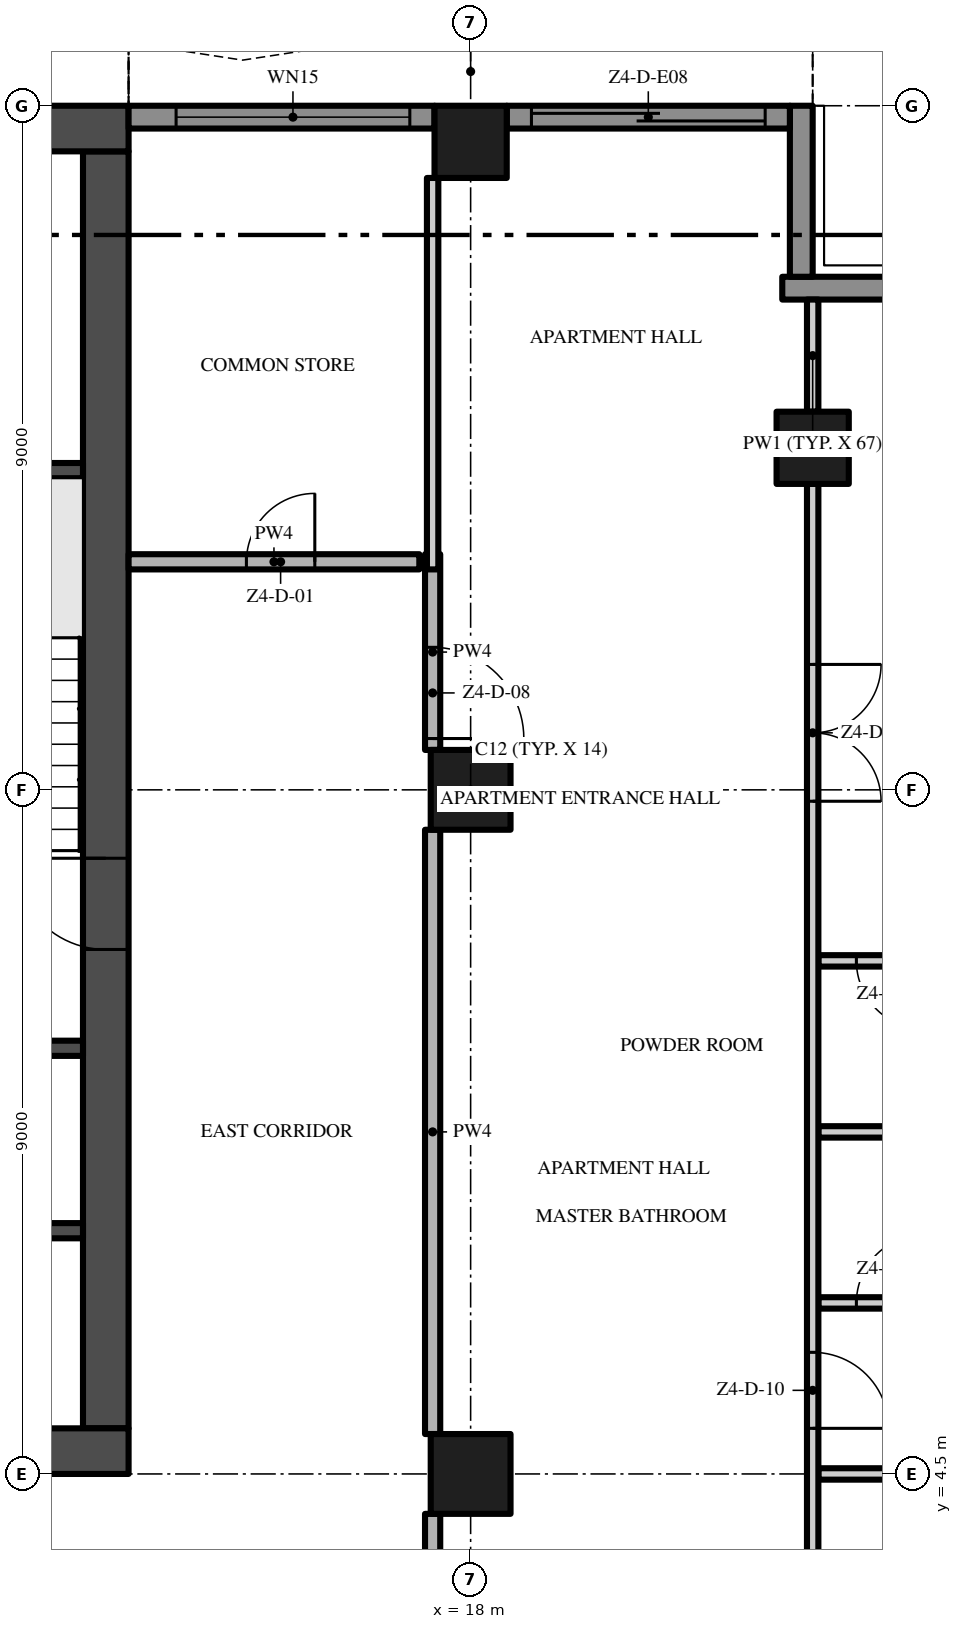
"""IFC4 building model, lengths in metres.
Left out: names, types, materials, properties, quantities, classifications, styles, units other than length and angle.
Written with IfcOpenShell. Run it as: python <this file> out.ifc"""

import sys

from ifc_helpers import new_model, si_unit, direction, frame, frame_2d, origin, origin_2d, place, context, subcontext, project, spatial, polyline, rectangle, outline, extrude, element, fill, save


model = new_model("IFC4")
c1 = context("Model", 3, precision=1e-05, world=origin(), true_north=direction((0.0, 1.0)))
c2 = subcontext(c1, "Body", "Model", "MODEL_VIEW")
j1 = project(units=[si_unit("LENGTHUNIT", "METRE"), si_unit("PLANEANGLEUNIT", "RADIAN")], contexts=[c1])
p1 = place(None, origin())
s1 = spatial("IfcSite", under=j1, at=p1, CompositionType="ELEMENT")
p2 = place(p1, origin())
s2 = spatial("IfcBuilding", under=s1, at=p2, CompositionType="ELEMENT")
p3 = place(p2, frame((0.0, 0.0, 218.6)))
s3 = spatial("IfcBuildingStorey", under=s2, at=p3, CompositionType="ELEMENT", Elevation=218.6)
p4 = place(p3, frame((-13.5, 4.8, -0.3), z_axis=(0.0, 0.0, 1.0), x_axis=(1.0, 0.0, 0.0)))
e1 = element("IfcWall", 1, at=p4, inside=s3, PredefinedType="SHEAR", context=c2, shape_type="SweptSolid", body=[
    extrude(rectangle(XDim=27.0, YDim=0.6, at=frame_2d((13.5, 0.0))), origin(), (0.0, 0.0, 1.0), 3.8),
])
p5 = place(p4, frame((12.0, 0.0, 0.3)))
e2 = element("IfcOpeningElement", 2, at=p5, cuts=e1, PredefinedType="OPENING", context=c2, shape_type="SweptSolid", body=[
    extrude(rectangle(XDim=3.0, YDim=2.4, at=frame_2d((1.5, 1.2))), frame((0.0, 0.31, 0.0), z_axis=(0.0, -1.0, 0.0), x_axis=(1.0, 0.0, 0.0)), (0.0, 0.0, 1.0), 0.62),
])
p6 = place(p4, frame((4.9, 0.0, 0.3)))
e3 = element("IfcOpeningElement", 3, at=p6, cuts=e1, PredefinedType="OPENING", context=c2, shape_type="SweptSolid", body=[
    extrude(rectangle(XDim=1.2, YDim=2.2, at=frame_2d((0.6, 1.1))), frame((0.0, 0.31, 0.0), z_axis=(0.0, -1.0, 0.0), x_axis=(1.0, 0.0, 0.0)), (0.0, 0.0, 1.0), 0.62),
])
p7 = place(p4, frame((20.75, 0.0, 0.3)))
e4 = element("IfcOpeningElement", 4, at=p7, cuts=e1, PredefinedType="OPENING", context=c2, shape_type="SweptSolid", body=[
    extrude(rectangle(XDim=1.5, YDim=2.2, at=frame_2d((0.75, 1.1))), frame((0.0, 0.31, 0.0), z_axis=(0.0, -1.0, 0.0), x_axis=(1.0, 0.0, 0.0)), (0.0, 0.0, 1.0), 0.62),
])
p8 = place(p4, frame((17.4, 0.0, 0.3)))
e5 = element("IfcOpeningElement", 5, at=p8, cuts=e1, PredefinedType="OPENING", context=c2, shape_type="SweptSolid", body=[
    extrude(rectangle(XDim=1.2, YDim=2.2, at=frame_2d((0.6, 1.1))), frame((0.0, 0.31, 0.0), z_axis=(0.0, -1.0, 0.0), x_axis=(1.0, 0.0, 0.0)), (0.0, 0.0, 1.0), 0.62),
])
p9 = place(p3, frame((13.2, 5.1, -0.3), z_axis=(0.0, 0.0, 1.0), x_axis=(0.0, 1.0, 0.0)))
e6 = element("IfcWall", 6, at=p9, inside=s3, PredefinedType="SHEAR", context=c2, shape_type="SweptSolid", body=[
    extrude(rectangle(XDim=16.8, YDim=0.6, at=frame_2d((8.4, 0.0))), origin(), (0.0, 0.0, 1.0), 3.8),
])
p10 = place(p9, frame((6.3, 0.0, 0.3)))
e7 = element("IfcOpeningElement", 7, at=p10, cuts=e6, PredefinedType="OPENING", context=c2, shape_type="SweptSolid", body=[
    extrude(rectangle(XDim=1.2, YDim=2.2, at=frame_2d((0.6, 1.1))), frame((0.0, 0.31, 0.0), z_axis=(0.0, -1.0, 0.0), x_axis=(1.0, 0.0, 0.0)), (0.0, 0.0, 1.0), 0.62),
])
p11 = place(p3, frame((13.5, 22.2, -0.3), z_axis=(0.0, 0.0, 1.0), x_axis=(-1.0, 0.0, 0.0)))
e8 = element("IfcWall", 8, at=p11, inside=s3, PredefinedType="SHEAR", context=c2, shape_type="SweptSolid", body=[
    extrude(rectangle(XDim=27.0, YDim=0.6, at=frame_2d((13.5, 0.0))), origin(), (0.0, 0.0, 1.0), 3.8),
])
p12 = place(p3, frame((18.0, 13.5, 0.0), z_axis=(0.0, 0.0, 1.0), x_axis=(1.0, 0.0, 0.0)))
e9 = element("IfcColumn", 9, at=p12, inside=s3, PredefinedType="COLUMN", context=c2, shape_type="SweptSolid", body=[
    extrude(rectangle(XDim=1.05, YDim=1.05, at=origin_2d()), origin(), (0.0, 0.0, 1.0), 3.5),
])
p13 = place(p3, frame((18.0, 22.025, 0.0), z_axis=(0.0, 0.0, 1.0), x_axis=(1.0, 0.0, 0.0)))
e10 = element("IfcColumn", 10, at=p13, inside=s3, PredefinedType="COLUMN", context=c2, shape_type="SweptSolid", body=[
    extrude(rectangle(XDim=0.95, YDim=0.95, at=origin_2d()), origin(), (0.0, 0.0, 1.0), 3.5),
])
p14 = place(p3, frame((18.0, 4.5, 0.0), z_axis=(0.0, 0.0, 1.0), x_axis=(1.0, 0.0, 0.0)))
e11 = element("IfcColumn", 11, at=p14, inside=s3, PredefinedType="COLUMN", context=c2, shape_type="SweptSolid", body=[
    extrude(rectangle(XDim=1.05, YDim=1.05, at=origin_2d()), origin(), (0.0, 0.0, 1.0), 3.5),
])
p15 = place(p3, frame((22.5, 18.0, 0.0), z_axis=(0.0, 0.0, 1.0), x_axis=(1.0, 0.0, 0.0)))
e12 = element("IfcColumn", 12, at=p15, inside=s3, PredefinedType="COLUMN", context=c2, shape_type="SweptSolid", body=[
    extrude(rectangle(XDim=0.95, YDim=0.95, at=origin_2d()), origin(), (0.0, 0.0, 1.0), 3.5),
])
p16 = place(p3, frame((22.1, 20.1, 0.0), z_axis=(0.0, 0.0, 1.0), x_axis=(1.0, 0.0, 0.0)))
e13 = element("IfcWall", 13, at=p16, inside=s3, PredefinedType="SOLIDWALL", context=c2, shape_type="SweptSolid", body=[
    extrude(rectangle(XDim=2.35, YDim=0.3, at=frame_2d((1.175, 0.0))), origin(), (0.0, 0.0, 1.0), 3.5),
])
p17 = place(p3, frame((22.35, 22.5, 0.0), z_axis=(0.0, 0.0, 1.0), x_axis=(0.0, -1.0, 0.0)))
e14 = element("IfcWall", 14, at=p17, inside=s3, PredefinedType="SOLIDWALL", context=c2, shape_type="SweptSolid", body=[
    extrude(rectangle(XDim=2.25, YDim=0.3, at=frame_2d((1.125, 0.0))), origin(), (0.0, 0.0, 1.0), 3.5),
])
p18 = place(p3, frame((18.475, 22.35, 0.0), z_axis=(0.0, 0.0, 1.0), x_axis=(1.0, 0.0, 0.0)))
e15 = element("IfcWall", 15, at=p18, inside=s3, PredefinedType="SOLIDWALL", context=c2, shape_type="SweptSolid", body=[
    extrude(rectangle(XDim=3.725, YDim=0.3, at=frame_2d((1.863, 0.0))), origin(), (0.0, 0.0, 1.0), 3.5),
])
p19 = place(p18, frame((0.325, 0.0, 0.0)))
e16 = element("IfcOpeningElement", 16, at=p19, cuts=e15, PredefinedType="OPENING", context=c2, shape_type="SweptSolid", body=[
    extrude(rectangle(XDim=3.075, YDim=2.4, at=frame_2d((1.538, 1.2))), frame((0.0, 0.16, 0.0), z_axis=(0.0, -1.0, 0.0), x_axis=(1.0, 0.0, 0.0)), (0.0, 0.0, 1.0), 0.32),
])
p20 = place(p3, frame((13.5, 22.35, 0.0), z_axis=(0.0, 0.0, 1.0), x_axis=(1.0, 0.0, 0.0)))
e17 = element("IfcWall", 17, at=p20, inside=s3, PredefinedType="SOLIDWALL", context=c2, shape_type="SweptSolid", body=[
    extrude(rectangle(XDim=4.025, YDim=0.3, at=frame_2d((2.013, 0.0))), origin(), (0.0, 0.0, 1.0), 3.5),
])
p21 = place(p20, frame((0.625, 0.0, 0.45)))
e18 = element("IfcOpeningElement", 18, at=p21, cuts=e17, PredefinedType="OPENING", context=c2, shape_type="SweptSolid", body=[
    extrude(rectangle(XDim=3.075, YDim=2.65, at=frame_2d((1.538, 1.325))), frame((0.0, 0.16, 0.0), z_axis=(0.0, -1.0, 0.0), x_axis=(1.0, 0.0, 0.0)), (0.0, 0.0, 1.0), 0.32),
])
p22 = place(p3, origin())
e19 = element("IfcWall", 19, at=p22, inside=s3, PredefinedType="USERDEFINED", context=c2, shape_type="SweptSolid", body=[
    extrude(outline(polyline([(22.5, 25.5), (21.0, 25.271), (19.5, 24.671), (18.0, 23.929), (16.5, 23.329), (15.0, 23.1), (13.5, 23.329), (13.462, 23.082), (15.0, 22.847), (16.566, 23.086), (18.102, 23.701), (19.602, 24.442), (21.066, 25.028), (22.538, 25.253), (22.5, 25.5)])), origin(), (0.0, 0.0, 1.0), 0.9),
])
for number, where, z_axis, x_axis in (
    (20, (9.65, 7.7, 0.0), (0.0, 0.0, 1.0), (1.0, 0.0, 0.0)),
    (21, (9.65, 10.1, 0.0), (0.0, 0.0, 1.0), (1.0, 0.0, 0.0)),
    (22, (9.65, 17.7, 0.0), (0.0, 0.0, 1.0), (1.0, 0.0, 0.0)),
):
    element("IfcWall", number, at=place(p3, frame(where, z_axis=z_axis, x_axis=x_axis)), inside=s3, PredefinedType="SHEAR", context=c2, shape_type="SweptSolid", body=[
        extrude(rectangle(XDim=3.25, YDim=0.2, at=frame_2d((1.625, 0.0))), origin(), (0.0, 0.0, 1.0), 3.5),
    ])
p23 = place(p3, frame((22.575, 4.5, 0.0), z_axis=(0.0, 0.0, 1.0), x_axis=(1.0, 0.0, 0.0)))
e23 = element("IfcWall", 23, at=p23, inside=s3, PredefinedType="PARTITIONING", context=c2, shape_type="SweptSolid", body=[
    extrude(rectangle(XDim=3.475, YDim=0.15, at=frame_2d((1.738, 0.0))), origin(), (0.0, 0.0, 1.0), 3.5),
])
p24 = place(p3, frame((22.575, 6.75, 0.0), z_axis=(0.0, 0.0, 1.0), x_axis=(1.0, 0.0, 0.0)))
e24 = element("IfcWall", 24, at=p24, inside=s3, PredefinedType="PARTITIONING", context=c2, shape_type="SweptSolid", body=[
    extrude(rectangle(XDim=1.875, YDim=0.15, at=frame_2d((0.938, 0.0))), origin(), (0.0, 0.0, 1.0), 3.5),
])
p25 = place(p24, frame((0.5, 0.0, 0.0)))
e25 = element("IfcOpeningElement", 25, at=p25, cuts=e24, PredefinedType="OPENING", context=c2, shape_type="SweptSolid", body=[
    extrude(rectangle(XDim=0.9, YDim=2.1, at=frame_2d((0.45, 1.05))), frame((0.0, 0.085, 0.0), z_axis=(0.0, -1.0, 0.0), x_axis=(1.0, 0.0, 0.0)), (0.0, 0.0, 1.0), 0.17),
])
p26 = place(p3, frame((22.575, 9.0, 0.0), z_axis=(0.0, 0.0, 1.0), x_axis=(1.0, 0.0, 0.0)))
e26 = element("IfcWall", 26, at=p26, inside=s3, PredefinedType="PARTITIONING", context=c2, shape_type="SweptSolid", body=[
    extrude(rectangle(XDim=1.875, YDim=0.15, at=frame_2d((0.938, 0.0))), origin(), (0.0, 0.0, 1.0), 3.5),
])
p27 = place(p3, frame((24.45, 11.25, 0.0), z_axis=(0.0, 0.0, 1.0), x_axis=(-1.0, 0.0, 0.0)))
e27 = element("IfcWall", 27, at=p27, inside=s3, PredefinedType="PARTITIONING", context=c2, shape_type="SweptSolid", body=[
    extrude(rectangle(XDim=1.875, YDim=0.15, at=frame_2d((0.938, 0.0))), origin(), (0.0, 0.0, 1.0), 3.5),
])
p28 = place(p27, frame((0.475, 0.0, 0.0)))
e28 = element("IfcOpeningElement", 28, at=p28, cuts=e27, PredefinedType="OPENING", context=c2, shape_type="SweptSolid", body=[
    extrude(rectangle(XDim=0.9, YDim=2.1, at=frame_2d((0.45, 1.05))), frame((0.0, 0.085, 0.0), z_axis=(0.0, -1.0, 0.0), x_axis=(1.0, 0.0, 0.0)), (0.0, 0.0, 1.0), 0.17),
])
p29 = place(p3, frame((13.5, 16.5, 0.0), z_axis=(0.0, 0.0, 1.0), x_axis=(1.0, 0.0, 0.0)))
e29 = element("IfcWall", 29, at=p29, inside=s3, PredefinedType="PARTITIONING", context=c2, shape_type="SweptSolid", body=[
    extrude(rectangle(XDim=3.825, YDim=0.2, at=frame_2d((1.913, 0.0))), origin(), (0.0, 0.0, 1.0), 3.5),
])
p30 = place(p29, frame((1.55, 0.0, 0.0)))
e30 = element("IfcOpeningElement", 30, at=p30, cuts=e29, PredefinedType="OPENING", context=c2, shape_type="SweptSolid", body=[
    extrude(rectangle(XDim=0.9, YDim=2.1, at=frame_2d((0.45, 1.05))), frame((0.0, 0.11, 0.0), z_axis=(0.0, -1.0, 0.0), x_axis=(1.0, 0.0, 0.0)), (0.0, 0.0, 1.0), 0.22),
])
p31 = place(p3, frame((17.5, -0.2, 0.0), z_axis=(0.0, 0.0, 1.0), x_axis=(0.0, 1.0, 0.0)))
e31 = element("IfcWall", 31, at=p31, inside=s3, PredefinedType="PARTITIONING", context=c2, shape_type="SweptSolid", body=[
    extrude(rectangle(XDim=4.175, YDim=0.2, at=frame_2d((2.087, 0.0))), origin(), (0.0, 0.0, 1.0), 3.5),
])
p32 = place(p3, frame((17.5, 5.025, 0.0), z_axis=(0.0, 0.0, 1.0), x_axis=(0.0, 1.0, 0.0)))
e32 = element("IfcWall", 32, at=p32, inside=s3, PredefinedType="PARTITIONING", context=c2, shape_type="SweptSolid", body=[
    extrude(rectangle(XDim=7.95, YDim=0.2, at=frame_2d((3.975, 0.0))), origin(), (0.0, 0.0, 1.0), 3.5),
])
p33 = place(p3, frame((17.5, 16.6, 0.0), z_axis=(0.0, 0.0, 1.0), x_axis=(0.0, -1.0, 0.0)))
e33 = element("IfcWall", 33, at=p33, inside=s3, PredefinedType="PARTITIONING", context=c2, shape_type="SweptSolid", body=[
    extrude(rectangle(XDim=2.575, YDim=0.2, at=frame_2d((1.288, 0.0))), origin(), (0.0, 0.0, 1.0), 3.5),
])
p34 = place(p33, frame((1.225, 0.0, 0.0)))
e34 = element("IfcOpeningElement", 34, at=p34, cuts=e33, PredefinedType="OPENING", context=c2, shape_type="SweptSolid", body=[
    extrude(rectangle(XDim=1.2, YDim=2.4, at=frame_2d((0.6, 1.2))), frame((0.0, 0.11, 0.0), z_axis=(0.0, -1.0, 0.0), x_axis=(1.0, 0.0, 0.0)), (0.0, 0.0, 1.0), 0.22),
])
p35 = place(p3, frame((17.5, 16.4, 0.0), z_axis=(0.0, 0.0, 1.0), x_axis=(0.0, 1.0, 0.0)))
e35 = element("IfcWall", 35, at=p35, inside=s3, PredefinedType="PARTITIONING", context=c2, shape_type="SweptSolid", body=[
    extrude(rectangle(XDim=5.15, YDim=0.15, at=frame_2d((2.575, 0.0))), origin(), (0.0, 0.0, 1.0), 3.5),
])
p36 = place(p3, frame((22.5, 17.525, 0.0), z_axis=(0.0, 0.0, 1.0), x_axis=(0.0, -1.0, 0.0)))
e36 = element("IfcWall", 36, at=p36, inside=s3, PredefinedType="PARTITIONING", context=c2, shape_type="SweptSolid", body=[
    extrude(rectangle(XDim=17.425, YDim=0.15, at=frame_2d((8.713, 0.0))), origin(), (0.0, 0.0, 1.0), 3.5),
])
p37 = place(p36, frame((14.775, 0.0, 0.0)))
e37 = element("IfcOpeningElement", 37, at=p37, cuts=e36, PredefinedType="OPENING", context=c2, shape_type="SweptSolid", body=[
    extrude(rectangle(XDim=1.0, YDim=2.4, at=frame_2d((0.5, 1.2))), frame((0.0, 0.085, 0.0), z_axis=(0.0, -1.0, 0.0), x_axis=(1.0, 0.0, 0.0)), (0.0, 0.0, 1.0), 0.17),
])
p38 = place(p36, frame((11.425, 0.0, 0.0)))
e38 = element("IfcOpeningElement", 38, at=p38, cuts=e36, PredefinedType="OPENING", context=c2, shape_type="SweptSolid", body=[
    extrude(rectangle(XDim=1.0, YDim=2.4, at=frame_2d((0.5, 1.2))), frame((0.0, 0.085, 0.0), z_axis=(0.0, -1.0, 0.0), x_axis=(1.0, 0.0, 0.0)), (0.0, 0.0, 1.0), 0.17),
])
p39 = place(p36, frame((2.375, 0.0, 0.0)))
e39 = element("IfcOpeningElement", 39, at=p39, cuts=e36, PredefinedType="OPENING", context=c2, shape_type="SweptSolid", body=[
    extrude(rectangle(XDim=1.8, YDim=2.4, at=frame_2d((0.9, 1.2))), frame((0.0, 0.085, 0.0), z_axis=(0.0, -1.0, 0.0), x_axis=(1.0, 0.0, 0.0)), (0.0, 0.0, 1.0), 0.17),
])
p40 = place(p3, frame((22.5, 18.475, 0.0), z_axis=(0.0, 0.0, 1.0), x_axis=(0.0, 1.0, 0.0)))
e40 = element("IfcWall", 40, at=p40, inside=s3, PredefinedType="PARTITIONING", context=c2, shape_type="SweptSolid", body=[
    extrude(rectangle(XDim=1.475, YDim=0.15, at=frame_2d((0.738, 0.0))), origin(), (0.0, 0.0, 1.0), 3.5),
])
p41 = place(p19, origin())
e41 = element("IfcDoor", 41, at=p41, inside=s3, OperationType="SINGLE_SWING_LEFT", PredefinedType="DOOR", context=c2, shape_type="SweptSolid", body=[
    extrude(rectangle(XDim=3.075, YDim=2.4, at=frame_2d((1.538, 1.2))), frame((0.0, 0.025, 0.0), z_axis=(0.0, -1.0, 0.0), x_axis=(1.0, 0.0, 0.0)), (0.0, 0.0, 1.0), 0.05),
])
fill(e16, e41)
p42 = place(p21, origin())
e42 = element("IfcWindow", 42, at=p42, inside=s3, PartitioningType="SINGLE_PANEL", PredefinedType="WINDOW", context=c2, shape_type="SweptSolid", body=[
    extrude(rectangle(XDim=3.075, YDim=2.65, at=frame_2d((1.538, 1.325))), frame((0.0, 0.03, 0.0), z_axis=(0.0, -1.0, 0.0), x_axis=(1.0, 0.0, 0.0)), (0.0, 0.0, 1.0), 0.06),
])
fill(e18, e42)
p43 = place(p10, frame((1.2, 0.0, 0.0), z_axis=(0.0, 0.0, 1.0), x_axis=(-1.0, 0.0, 0.0)))
e43 = element("IfcDoor", 43, at=p43, inside=s3, OperationType="SINGLE_SWING_LEFT", PredefinedType="DOOR", context=c2, shape_type="SweptSolid", body=[
    extrude(rectangle(XDim=1.2, YDim=2.2, at=frame_2d((0.6, 1.1))), frame((0.0, 0.025, 0.0), z_axis=(0.0, -1.0, 0.0), x_axis=(1.0, 0.0, 0.0)), (0.0, 0.0, 1.0), 0.05),
])
fill(e7, e43)
p44 = place(p30, origin())
e44 = element("IfcDoor", 44, at=p44, inside=s3, OperationType="SINGLE_SWING_RIGHT", PredefinedType="DOOR", context=c2, shape_type="SweptSolid", body=[
    extrude(rectangle(XDim=0.9, YDim=2.1, at=frame_2d((0.45, 1.05))), frame((0.0, 0.025, 0.0), z_axis=(0.0, -1.0, 0.0), x_axis=(1.0, 0.0, 0.0)), (0.0, 0.0, 1.0), 0.05),
])
fill(e30, e44)
p45 = place(p34, origin())
e45 = element("IfcDoor", 45, at=p45, inside=s3, OperationType="SINGLE_SWING_RIGHT", PredefinedType="DOOR", context=c2, shape_type="SweptSolid", body=[
    extrude(rectangle(XDim=1.2, YDim=2.4, at=frame_2d((0.6, 1.2))), frame((0.0, 0.025, 0.0), z_axis=(0.0, -1.0, 0.0), x_axis=(1.0, 0.0, 0.0)), (0.0, 0.0, 1.0), 0.05),
])
fill(e34, e45)
p46 = place(p38, origin())
e46 = element("IfcDoor", 46, at=p46, inside=s3, OperationType="SINGLE_SWING_RIGHT", PredefinedType="DOOR", context=c2, shape_type="SweptSolid", body=[
    extrude(rectangle(XDim=1.0, YDim=2.4, at=frame_2d((0.5, 1.2))), frame((0.0, 0.025, 0.0), z_axis=(0.0, -1.0, 0.0), x_axis=(1.0, 0.0, 0.0)), (0.0, 0.0, 1.0), 0.05),
])
fill(e38, e46)
p47 = place(p25, origin())
e47 = element("IfcDoor", 47, at=p47, inside=s3, OperationType="SINGLE_SWING_RIGHT", PredefinedType="DOOR", context=c2, shape_type="SweptSolid", body=[
    extrude(rectangle(XDim=0.9, YDim=2.1, at=frame_2d((0.45, 1.05))), frame((0.0, 0.025, 0.0), z_axis=(0.0, -1.0, 0.0), x_axis=(1.0, 0.0, 0.0)), (0.0, 0.0, 1.0), 0.05),
])
fill(e25, e47)
p48 = place(p39, origin())
e48 = element("IfcDoor", 48, at=p48, inside=s3, OperationType="DOUBLE_DOOR_SINGLE_SWING", PredefinedType="DOOR", context=c2, shape_type="SweptSolid", body=[
    extrude(rectangle(XDim=1.8, YDim=2.4, at=frame_2d((0.9, 1.2))), frame((0.0, 0.025, 0.0), z_axis=(0.0, -1.0, 0.0), x_axis=(1.0, 0.0, 0.0)), (0.0, 0.0, 1.0), 0.05),
])
fill(e39, e48)
p49 = place(p28, origin())
e49 = element("IfcDoor", 49, at=p49, inside=s3, OperationType="SINGLE_SWING_LEFT", PredefinedType="DOOR", context=c2, shape_type="SweptSolid", body=[
    extrude(rectangle(XDim=0.9, YDim=2.1, at=frame_2d((0.45, 1.05))), frame((0.0, 0.025, 0.0), z_axis=(0.0, -1.0, 0.0), x_axis=(1.0, 0.0, 0.0)), (0.0, 0.0, 1.0), 0.05),
])
fill(e28, e49)
save(model, sys.argv[1])
